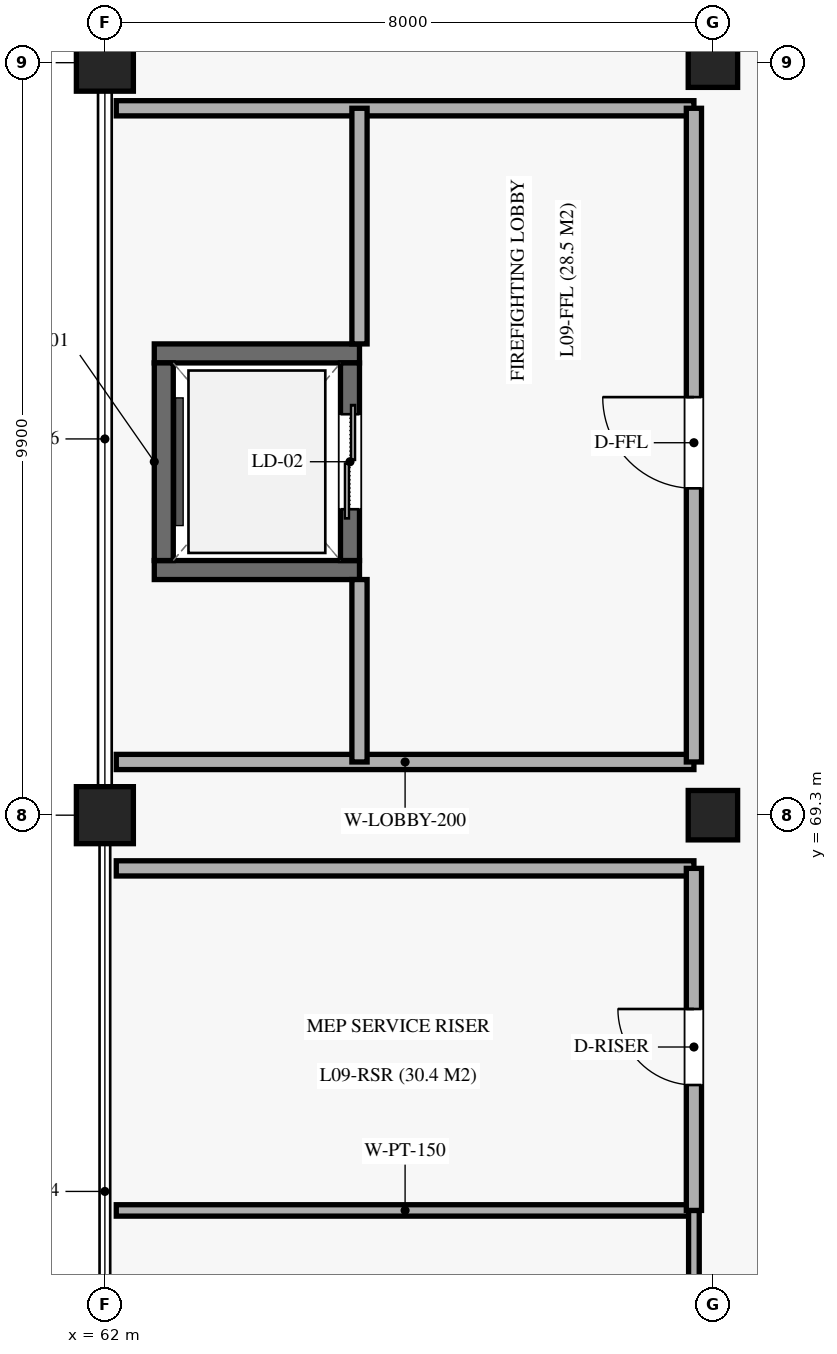
"""IFC4 building model, lengths in metres.
Left out: names, types, materials, properties, quantities, classifications, styles, units other than length and angle.
Written with IfcOpenShell. Run it as: python <this file> out.ifc"""

import sys

from ifc_helpers import new_model, si_unit, direction, frame, frame_2d, origin, origin_2d, place, context, subcontext, project, spatial, rectangle, extrude, element, fill, save


model = new_model("IFC4")
c1 = context("Model", 3, precision=1e-05, world=origin(), true_north=direction((0.0, 1.0)))
c2 = subcontext(c1, "Body", "Model", "MODEL_VIEW")
j1 = project(units=[si_unit("LENGTHUNIT", "METRE"), si_unit("PLANEANGLEUNIT", "RADIAN")], contexts=[c1])
p1 = place(None, origin())
s1 = spatial("IfcSite", under=j1, at=p1, CompositionType="ELEMENT")
p2 = place(p1, origin())
s2 = spatial("IfcBuilding", under=s1, at=p2, CompositionType="ELEMENT")
p3 = place(p2, frame((0.0, 0.0, 46.92)))
s3 = spatial("IfcBuildingStorey", under=s2, at=p3, CompositionType="ELEMENT", Elevation=46.92)
for number, where, z_axis, x_axis in (
    (1, (62.0, 69.3, 0.0), (0.0, 0.0, 1.0), (1.0, 0.0, 0.0)),
    (2, (62.0, 79.2, 0.0), (0.0, 0.0, 1.0), (1.0, 0.0, 0.0)),
):
    element("IfcColumn", number, at=place(p3, frame(where, z_axis=z_axis, x_axis=x_axis)), inside=s3, PredefinedType="COLUMN", context=c2, shape_type="SweptSolid", body=[
        extrude(rectangle(XDim=0.75, YDim=0.75, at=origin_2d()), origin(), (0.0, 0.0, 1.0), 5.1),
    ])
for number, where, z_axis, x_axis in (
    (3, (70.0, 69.3, 0.0), (0.0, 0.0, 1.0), (1.0, 0.0, 0.0)),
    (4, (70.0, 79.2, 0.0), (0.0, 0.0, 1.0), (1.0, 0.0, 0.0)),
):
    element("IfcColumn", number, at=place(p3, frame(where, z_axis=z_axis, x_axis=x_axis)), inside=s3, PredefinedType="COLUMN", context=c2, shape_type="SweptSolid", body=[
        extrude(rectangle(XDim=0.65, YDim=0.65, at=origin_2d()), origin(), (0.0, 0.0, 1.0), 5.1),
    ])
for number, where, z_axis, x_axis in (
    (5, (62.65, 72.525, 0.0), (0.0, 0.0, 1.0), (1.0, 0.0, 0.0)),
    (6, (62.65, 75.375, 0.0), (0.0, 0.0, 1.0), (1.0, 0.0, 0.0)),
):
    element("IfcWall", number, at=place(p3, frame(where, z_axis=z_axis, x_axis=x_axis)), inside=s3, PredefinedType="SOLIDWALL", context=c2, shape_type="SweptSolid", body=[
        extrude(rectangle(XDim=2.7, YDim=0.25, at=frame_2d((1.35, 0.0))), origin(), (0.0, 0.0, 1.0), 4.83),
    ])
p4 = place(p3, frame((62.775, 72.65, 0.0), z_axis=(0.0, 0.0, 1.0), x_axis=(0.0, 1.0, 0.0)))
e7 = element("IfcWall", 7, at=p4, inside=s3, PredefinedType="SOLIDWALL", context=c2, shape_type="SweptSolid", body=[
    extrude(rectangle(XDim=2.6, YDim=0.25, at=frame_2d((1.3, 0.0))), origin(), (0.0, 0.0, 1.0), 4.83),
])
p5 = place(p3, frame((65.225, 72.65, 0.0), z_axis=(0.0, 0.0, 1.0), x_axis=(0.0, 1.0, 0.0)))
e8 = element("IfcWall", 8, at=p5, inside=s3, PredefinedType="SOLIDWALL", context=c2, shape_type="SweptSolid", body=[
    extrude(rectangle(XDim=2.6, YDim=0.25, at=frame_2d((1.3, 0.0))), origin(), (0.0, 0.0, 1.0), 4.83),
])
p6 = place(p5, frame((0.675, 0.0, 0.0)))
e9 = element("IfcOpeningElement", 9, at=p6, cuts=e8, PredefinedType="OPENING", context=c2, shape_type="SweptSolid", body=[
    extrude(rectangle(XDim=1.25, YDim=2.2, at=frame_2d((0.625, 1.1))), frame((0.0, 0.135, 0.0), z_axis=(0.0, -1.0, 0.0), x_axis=(1.0, 0.0, 0.0)), (0.0, 0.0, 1.0), 0.27),
])
for number, where, z_axis, x_axis in (
    (10, (62.15, 70.0, 0.0), (0.0, 0.0, 1.0), (1.0, 0.0, 0.0)),
    (11, (62.15, 78.6, 0.0), (0.0, 0.0, 1.0), (1.0, 0.0, 0.0)),
):
    element("IfcWall", number, at=place(p3, frame(where, z_axis=z_axis, x_axis=x_axis)), inside=s3, PredefinedType="SOLIDWALL", context=c2, shape_type="SweptSolid", body=[
        extrude(rectangle(XDim=7.6, YDim=0.2, at=frame_2d((3.8, 0.0))), origin(), (0.0, 0.0, 1.0), 3.97),
    ])
p7 = place(p3, frame((65.35, 70.0, 0.0), z_axis=(0.0, 0.0, 1.0), x_axis=(0.0, 1.0, 0.0)))
e12 = element("IfcWall", 12, at=p7, inside=s3, PredefinedType="SOLIDWALL", context=c2, shape_type="SweptSolid", body=[
    extrude(rectangle(XDim=2.4, YDim=0.2, at=frame_2d((1.2, 0.0))), origin(), (0.0, 0.0, 1.0), 3.97),
])
p8 = place(p3, frame((65.35, 75.5, 0.0), z_axis=(0.0, 0.0, 1.0), x_axis=(0.0, 1.0, 0.0)))
e13 = element("IfcWall", 13, at=p8, inside=s3, PredefinedType="SOLIDWALL", context=c2, shape_type="SweptSolid", body=[
    extrude(rectangle(XDim=3.1, YDim=0.2, at=frame_2d((1.55, 0.0))), origin(), (0.0, 0.0, 1.0), 3.97),
])
p9 = place(p3, frame((69.75, 70.0, 0.0), z_axis=(0.0, 0.0, 1.0), x_axis=(0.0, 1.0, 0.0)))
e14 = element("IfcWall", 14, at=p9, inside=s3, PredefinedType="SOLIDWALL", context=c2, shape_type="SweptSolid", body=[
    extrude(rectangle(XDim=8.6, YDim=0.2, at=frame_2d((4.3, 0.0))), origin(), (0.0, 0.0, 1.0), 3.97),
])
p10 = place(p9, frame((3.6, 0.0, 0.0)))
e15 = element("IfcOpeningElement", 15, at=p10, cuts=e14, PredefinedType="OPENING", context=c2, shape_type="SweptSolid", body=[
    extrude(rectangle(XDim=1.2, YDim=2.25, at=frame_2d((0.6, 1.125))), frame((0.0, 0.11, 0.0), z_axis=(0.0, -1.0, 0.0), x_axis=(1.0, 0.0, 0.0)), (0.0, 0.0, 1.0), 0.22),
])
p11 = place(p3, frame((62.15, 64.1, 0.0), z_axis=(0.0, 0.0, 1.0), x_axis=(1.0, 0.0, 0.0)))
e16 = element("IfcWall", 16, at=p11, inside=s3, PredefinedType="PARTITIONING", context=c2, shape_type="SweptSolid", body=[
    extrude(rectangle(XDim=7.6, YDim=0.15, at=frame_2d((3.8, 0.0))), origin(), (0.0, 0.0, 1.0), 3.97),
])
p12 = place(p3, frame((69.75, 59.9, 0.0), z_axis=(0.0, 0.0, 1.0), x_axis=(0.0, 1.0, 0.0)))
e17 = element("IfcWall", 17, at=p12, inside=s3, PredefinedType="PARTITIONING", context=c2, shape_type="SweptSolid", body=[
    extrude(rectangle(XDim=4.2, YDim=0.14, at=frame_2d((2.1, 0.0))), origin(), (0.0, 0.0, 1.0), 3.97),
])
p13 = place(p12, frame((1.5, 0.0, 0.0)))
e18 = element("IfcOpeningElement", 18, at=p13, cuts=e17, PredefinedType="OPENING", context=c2, shape_type="SweptSolid", body=[
    extrude(rectangle(XDim=0.95, YDim=2.1, at=frame_2d((0.475, 1.05))), frame((0.0, 0.08, 0.0), z_axis=(0.0, -1.0, 0.0), x_axis=(1.0, 0.0, 0.0)), (0.0, 0.0, 1.0), 0.16),
])
p14 = place(p3, frame((62.15, 68.6, 0.0), z_axis=(0.0, 0.0, 1.0), x_axis=(1.0, 0.0, 0.0)))
e19 = element("IfcWall", 19, at=p14, inside=s3, PredefinedType="SOLIDWALL", context=c2, shape_type="SweptSolid", body=[
    extrude(rectangle(XDim=7.6, YDim=0.2, at=frame_2d((3.8, 0.0))), origin(), (0.0, 0.0, 1.0), 3.97),
])
p15 = place(p3, frame((69.75, 64.1, 0.0), z_axis=(0.0, 0.0, 1.0), x_axis=(0.0, 1.0, 0.0)))
e20 = element("IfcWall", 20, at=p15, inside=s3, PredefinedType="SOLIDWALL", context=c2, shape_type="SweptSolid", body=[
    extrude(rectangle(XDim=4.5, YDim=0.2, at=frame_2d((2.25, 0.0))), origin(), (0.0, 0.0, 1.0), 3.97),
])
p16 = place(p15, frame((1.65, 0.0, 0.0)))
e21 = element("IfcOpeningElement", 21, at=p16, cuts=e20, PredefinedType="OPENING", context=c2, shape_type="SweptSolid", body=[
    extrude(rectangle(XDim=1.0, YDim=2.15, at=frame_2d((0.5, 1.075))), frame((0.0, 0.11, 0.0), z_axis=(0.0, -1.0, 0.0), x_axis=(1.0, 0.0, 0.0)), (0.0, 0.0, 1.0), 0.22),
])
p17 = place(p6, origin())
e22 = element("IfcDoor", 22, at=p17, inside=s3, OperationType="DOUBLE_DOOR_SLIDING", PredefinedType="DOOR", context=c2, shape_type="SweptSolid", body=[
    extrude(rectangle(XDim=1.25, YDim=2.2, at=frame_2d((0.625, 1.1))), frame((0.0, 0.025, 0.0), z_axis=(0.0, -1.0, 0.0), x_axis=(1.0, 0.0, 0.0)), (0.0, 0.0, 1.0), 0.05),
])
fill(e9, e22)
p18 = place(p10, origin())
e23 = element("IfcDoor", 23, at=p18, inside=s3, OperationType="SINGLE_SWING_RIGHT", PredefinedType="DOOR", context=c2, shape_type="SweptSolid", body=[
    extrude(rectangle(XDim=1.2, YDim=2.25, at=frame_2d((0.6, 1.125))), frame((0.0, 0.025, 0.0), z_axis=(0.0, -1.0, 0.0), x_axis=(1.0, 0.0, 0.0)), (0.0, 0.0, 1.0), 0.05),
])
fill(e15, e23)
p19 = place(p16, origin())
e24 = element("IfcDoor", 24, at=p19, inside=s3, OperationType="SINGLE_SWING_RIGHT", PredefinedType="DOOR", context=c2, shape_type="SweptSolid", body=[
    extrude(rectangle(XDim=1.0, YDim=2.15, at=frame_2d((0.5, 1.075))), frame((0.0, 0.025, 0.0), z_axis=(0.0, -1.0, 0.0), x_axis=(1.0, 0.0, 0.0)), (0.0, 0.0, 1.0), 0.05),
])
fill(e21, e24)
save(model, sys.argv[1])
